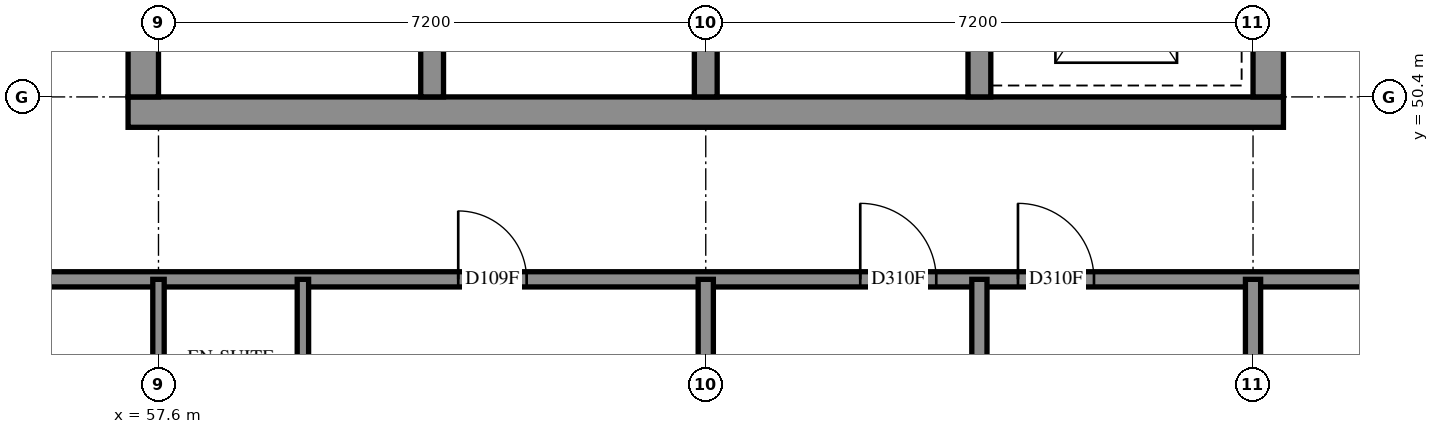
"""IFC4 building model, lengths in metres.
Left out: names, types, materials, properties, quantities, classifications, styles, units other than length and angle.
Written with IfcOpenShell. Run it as: python <this file> out.ifc"""

import sys

from ifc_helpers import new_model, si_unit, direction, frame, frame_2d, origin, place, context, subcontext, project, spatial, rectangle, extrude, element, fill, save


model = new_model("IFC4")
c1 = context("Model", 3, precision=1e-05, world=origin(), true_north=direction((0.0, 1.0)))
c2 = subcontext(c1, "Body", "Model", "MODEL_VIEW")
j1 = project(units=[si_unit("LENGTHUNIT", "METRE"), si_unit("PLANEANGLEUNIT", "RADIAN")], contexts=[c1])
p1 = place(None, origin())
s1 = spatial("IfcSite", under=j1, at=p1, CompositionType="ELEMENT")
p2 = place(p1, origin())
s2 = spatial("IfcBuilding", under=s1, at=p2, CompositionType="ELEMENT")
p3 = place(p2, frame((0.0, 0.0, 260.8)))
s3 = spatial("IfcBuildingStorey", under=s2, at=p3, CompositionType="ELEMENT", Elevation=260.8)
p4 = place(p3, frame((57.2, 50.2, -0.3), z_axis=(0.0, 0.0, 1.0), x_axis=(1.0, 0.0, 0.0)))
e1 = element("IfcWall", 1, at=p4, inside=s3, PredefinedType="SHEAR", context=c2, shape_type="SweptSolid", body=[
    extrude(rectangle(XDim=15.2, YDim=0.4, at=frame_2d((7.6, 0.0))), origin(), (0.0, 0.0, 1.0), 2.7),
])
p5 = place(p3, frame((57.4, 50.4, -0.3), z_axis=(0.0, 0.0, 1.0), x_axis=(0.0, 1.0, 0.0)))
e2 = element("IfcWall", 2, at=p5, inside=s3, PredefinedType="SHEAR", context=c2, shape_type="SweptSolid", body=[
    extrude(rectangle(XDim=14.4, YDim=0.4, at=frame_2d((7.2, 0.0))), origin(), (0.0, 0.0, 1.0), 2.7),
])
p6 = place(p5, frame((4.55, 0.0, 0.3)))
e3 = element("IfcOpeningElement", 3, at=p6, cuts=e2, PredefinedType="OPENING", context=c2, shape_type="SweptSolid", body=[
    extrude(rectangle(XDim=1.1, YDim=2.1, at=frame_2d((0.55, 1.05))), frame((0.0, 0.21, 0.0), z_axis=(0.0, -1.0, 0.0), x_axis=(1.0, 0.0, 0.0)), (0.0, 0.0, 1.0), 0.42),
])
p7 = place(p5, frame((11.35, 0.0, 0.3)))
e4 = element("IfcOpeningElement", 4, at=p7, cuts=e2, PredefinedType="OPENING", context=c2, shape_type="SweptSolid", body=[
    extrude(rectangle(XDim=1.1, YDim=2.1, at=frame_2d((0.55, 1.05))), frame((0.0, 0.21, 0.0), z_axis=(0.0, -1.0, 0.0), x_axis=(1.0, 0.0, 0.0)), (0.0, 0.0, 1.0), 0.42),
])
p8 = place(p3, frame((72.2, 50.4, -0.3), z_axis=(0.0, 0.0, 1.0), x_axis=(0.0, 1.0, 0.0)))
e5 = element("IfcWall", 5, at=p8, inside=s3, PredefinedType="SHEAR", context=c2, shape_type="SweptSolid", body=[
    extrude(rectangle(XDim=14.4, YDim=0.4, at=frame_2d((7.2, 0.0))), origin(), (0.0, 0.0, 1.0), 2.7),
])
p9 = place(p8, frame((4.55, 0.0, 0.3)))
e6 = element("IfcOpeningElement", 6, at=p9, cuts=e5, PredefinedType="OPENING", context=c2, shape_type="SweptSolid", body=[
    extrude(rectangle(XDim=1.1, YDim=2.1, at=frame_2d((0.55, 1.05))), frame((0.0, 0.21, 0.0), z_axis=(0.0, -1.0, 0.0), x_axis=(1.0, 0.0, 0.0)), (0.0, 0.0, 1.0), 0.42),
])
p10 = place(p8, frame((11.35, 0.0, 0.3)))
e7 = element("IfcOpeningElement", 7, at=p10, cuts=e5, PredefinedType="OPENING", context=c2, shape_type="SweptSolid", body=[
    extrude(rectangle(XDim=1.1, YDim=2.1, at=frame_2d((0.55, 1.05))), frame((0.0, 0.21, 0.0), z_axis=(0.0, -1.0, 0.0), x_axis=(1.0, 0.0, 0.0)), (0.0, 0.0, 1.0), 0.42),
])
for number, where, z_axis, x_axis in (
    (8, (61.2, 50.4, 0.0), (0.0, 0.0, 1.0), (0.0, 1.0, 0.0)),
    (9, (64.8, 50.4, 0.0), (0.0, 0.0, 1.0), (0.0, 1.0, 0.0)),
    (10, (68.4, 50.4, 0.0), (0.0, 0.0, 1.0), (0.0, 1.0, 0.0)),
):
    element("IfcWall", number, at=place(p3, frame(where, z_axis=z_axis, x_axis=x_axis)), inside=s3, PredefinedType="SOLIDWALL", context=c2, shape_type="SweptSolid", body=[
        extrude(rectangle(XDim=3.3, YDim=0.3, at=frame_2d((1.65, 0.0))), origin(), (0.0, 0.0, 1.0), 3.1),
    ])
p11 = place(p3, frame((55.2, 48.0, 0.0), z_axis=(0.0, 0.0, 1.0), x_axis=(1.0, 0.0, 0.0)))
e11 = element("IfcWall", 11, at=p11, inside=s3, PredefinedType="PARTITIONING", context=c2, shape_type="SweptSolid", body=[
    extrude(rectangle(XDim=19.15, YDim=0.2, at=frame_2d((9.575, 0.0))), origin(), (0.0, 0.0, 1.0), 3.1),
])
p12 = place(p11, frame((6.343, 0.0, 0.0)))
e12 = element("IfcOpeningElement", 12, at=p12, cuts=e11, PredefinedType="OPENING", context=c2, shape_type="SweptSolid", body=[
    extrude(rectangle(XDim=0.9, YDim=2.1, at=frame_2d((0.45, 1.05))), frame((0.0, 0.11, 0.0), z_axis=(0.0, -1.0, 0.0), x_axis=(1.0, 0.0, 0.0)), (0.0, 0.0, 1.0), 0.22),
])
p13 = place(p11, frame((11.633, 0.0, 0.0)))
e13 = element("IfcOpeningElement", 13, at=p13, cuts=e11, PredefinedType="OPENING", context=c2, shape_type="SweptSolid", body=[
    extrude(rectangle(XDim=1.0, YDim=2.1, at=frame_2d((0.5, 1.05))), frame((0.0, 0.11, 0.0), z_axis=(0.0, -1.0, 0.0), x_axis=(1.0, 0.0, 0.0)), (0.0, 0.0, 1.0), 0.22),
])
p14 = place(p11, frame((13.707, 0.0, 0.0)))
e14 = element("IfcOpeningElement", 14, at=p14, cuts=e11, PredefinedType="OPENING", context=c2, shape_type="SweptSolid", body=[
    extrude(rectangle(XDim=1.0, YDim=2.1, at=frame_2d((0.5, 1.05))), frame((0.0, 0.11, 0.0), z_axis=(0.0, -1.0, 0.0), x_axis=(1.0, 0.0, 0.0)), (0.0, 0.0, 1.0), 0.22),
])
p15 = place(p3, frame((68.4, 42.304, 0.0), z_axis=(0.0, 0.0, 1.0), x_axis=(0.0, 1.0, 0.0)))
e15 = element("IfcWall", 15, at=p15, inside=s3, PredefinedType="PARTITIONING", context=c2, shape_type="SweptSolid", body=[
    extrude(rectangle(XDim=5.696, YDim=0.2, at=frame_2d((2.848, 0.0))), origin(), (0.0, 0.0, 1.0), 3.1),
])
for number, where, z_axis, x_axis in (
    (16, (64.8, 43.55, 0.0), (0.0, 0.0, 1.0), (0.0, 1.0, 0.0)),
    (17, (72.0, 43.55, 0.0), (0.0, 0.0, 1.0), (0.0, 1.0, 0.0)),
):
    element("IfcWall", number, at=place(p3, frame(where, z_axis=z_axis, x_axis=x_axis)), inside=s3, PredefinedType="PARTITIONING", context=c2, shape_type="SweptSolid", body=[
        extrude(rectangle(XDim=4.45, YDim=0.2, at=frame_2d((2.225, 0.0))), origin(), (0.0, 0.0, 1.0), 3.1),
    ])
for number, where, z_axis, x_axis in (
    (18, (59.5, 45.6, 0.0), (0.0, 0.0, 1.0), (0.0, 1.0, 0.0)),
    (19, (57.6, 45.6, 0.0), (0.0, 0.0, 1.0), (0.0, 1.0, 0.0)),
):
    element("IfcWall", number, at=place(p3, frame(where, z_axis=z_axis, x_axis=x_axis)), inside=s3, PredefinedType="PARTITIONING", context=c2, shape_type="SweptSolid", body=[
        extrude(rectangle(XDim=2.4, YDim=0.15, at=frame_2d((1.2, 0.0))), origin(), (0.0, 0.0, 1.0), 3.1),
    ])
p16 = place(p12, origin())
e20 = element("IfcDoor", 20, at=p16, inside=s3, OperationType="SINGLE_SWING_LEFT", PredefinedType="DOOR", context=c2, shape_type="SweptSolid", body=[
    extrude(rectangle(XDim=0.9, YDim=2.1, at=frame_2d((0.45, 1.05))), frame((0.0, 0.025, 0.0), z_axis=(0.0, -1.0, 0.0), x_axis=(1.0, 0.0, 0.0)), (0.0, 0.0, 1.0), 0.05),
])
fill(e12, e20)
p17 = place(p13, origin())
e21 = element("IfcDoor", 21, at=p17, inside=s3, OperationType="SINGLE_SWING_LEFT", PredefinedType="DOOR", context=c2, shape_type="SweptSolid", body=[
    extrude(rectangle(XDim=1.0, YDim=2.1, at=frame_2d((0.5, 1.05))), frame((0.0, 0.025, 0.0), z_axis=(0.0, -1.0, 0.0), x_axis=(1.0, 0.0, 0.0)), (0.0, 0.0, 1.0), 0.05),
])
fill(e13, e21)
p18 = place(p14, origin())
e22 = element("IfcDoor", 22, at=p18, inside=s3, OperationType="SINGLE_SWING_RIGHT", PredefinedType="DOOR", context=c2, shape_type="SweptSolid", body=[
    extrude(rectangle(XDim=1.0, YDim=2.1, at=frame_2d((0.5, 1.05))), frame((0.0, 0.025, 0.0), z_axis=(0.0, -1.0, 0.0), x_axis=(1.0, 0.0, 0.0)), (0.0, 0.0, 1.0), 0.05),
])
fill(e14, e22)
save(model, sys.argv[1])
